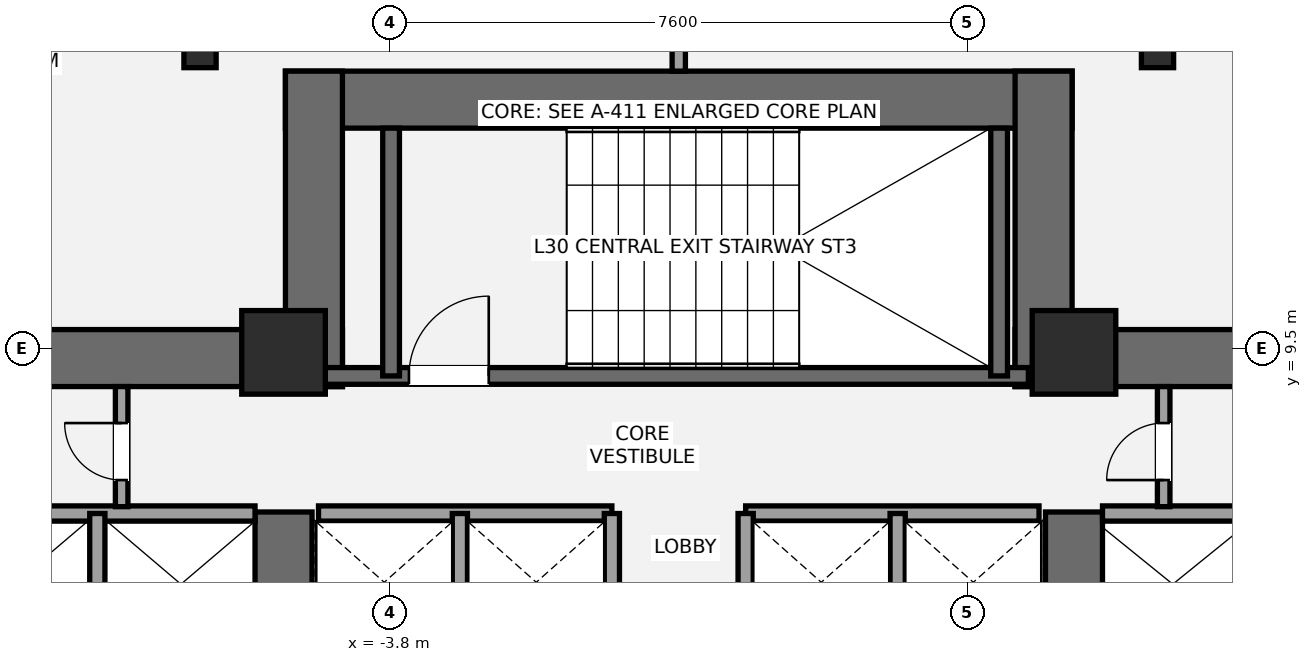
"""IFC4 building model, lengths in metres.
Left out: names, types, materials, properties, quantities, classifications, styles, units other than length and angle.
Written with IfcOpenShell. Run it as: python <this file> out.ifc"""

import sys

from ifc_helpers import new_model, si_unit, direction, frame, frame_2d, origin, origin_2d, place, context, subcontext, project, spatial, rectangle, i_section, extrude, element, fill, save


model = new_model("IFC4")
c1 = context("Model", 3, precision=1e-05, world=origin(), true_north=direction((0.0, 1.0)))
c2 = subcontext(c1, "Body", "Model", "MODEL_VIEW")
j1 = project(units=[si_unit("LENGTHUNIT", "METRE"), si_unit("PLANEANGLEUNIT", "RADIAN")], contexts=[c1])
p1 = place(None, origin())
s1 = spatial("IfcSite", under=j1, at=p1, CompositionType="ELEMENT")
p2 = place(p1, origin())
s2 = spatial("IfcBuilding", under=s1, at=p2, CompositionType="ELEMENT")
p3 = place(p2, frame((0.0, 0.0, 114.1)))
s3 = spatial("IfcBuildingStorey", under=s2, at=p3, CompositionType="ELEMENT", Elevation=114.1)
p4 = place(p3, frame((-13.9, 9.375, 0.0), z_axis=(0.0, 0.0, 1.0), x_axis=(1.0, 0.0, 0.0)))
e1 = element("IfcWall", 1, at=p4, inside=s3, PredefinedType="SHEAR", context=c2, shape_type="SweptSolid", body=[
    extrude(rectangle(XDim=9.475, YDim=0.75, at=frame_2d((4.737, 0.0))), origin(), (0.0, 0.0, 1.0), 3.5),
])
p5 = place(p3, frame((-5.2, 5.35, 0.0), z_axis=(0.0, 0.0, 1.0), x_axis=(0.0, 1.0, 0.0)))
e2 = element("IfcWall", 2, at=p5, inside=s3, PredefinedType="SHEAR", context=c2, shape_type="SweptSolid", body=[
    extrude(rectangle(XDim=2.0, YDim=0.75, at=frame_2d((1.0, 0.0))), origin(), (0.0, 0.0, 1.0), 3.5),
])
p6 = place(p3, frame((4.425, 9.375, 0.0), z_axis=(0.0, 0.0, 1.0), x_axis=(1.0, 0.0, 0.0)))
e3 = element("IfcWall", 3, at=p6, inside=s3, PredefinedType="SHEAR", context=c2, shape_type="SweptSolid", body=[
    extrude(rectangle(XDim=9.475, YDim=0.75, at=frame_2d((4.737, 0.0))), origin(), (0.0, 0.0, 1.0), 3.5),
])
p7 = place(p3, frame((5.2, 5.35, 0.0), z_axis=(0.0, 0.0, 1.0), x_axis=(0.0, 1.0, 0.0)))
e4 = element("IfcWall", 4, at=p7, inside=s3, PredefinedType="SHEAR", context=c2, shape_type="SweptSolid", body=[
    extrude(rectangle(XDim=2.0, YDim=0.75, at=frame_2d((1.0, 0.0))), origin(), (0.0, 0.0, 1.0), 3.5),
])
p8 = place(p3, frame((-5.175, 12.775, 0.0), z_axis=(0.0, 0.0, 1.0), x_axis=(1.0, 0.0, 0.0)))
e5 = element("IfcWall", 5, at=p8, inside=s3, PredefinedType="SHEAR", context=c2, shape_type="SweptSolid", body=[
    extrude(rectangle(XDim=10.35, YDim=0.75, at=frame_2d((5.175, 0.0))), origin(), (0.0, 0.0, 1.0), 3.5),
])
for number, where, z_axis, x_axis in (
    (6, (-4.8, 9.0, 0.0), (0.0, 0.0, 1.0), (0.0, 1.0, 0.0)),
    (7, (4.8, 9.0, 0.0), (0.0, 0.0, 1.0), (0.0, 1.0, 0.0)),
):
    element("IfcWall", number, at=place(p3, frame(where, z_axis=z_axis, x_axis=x_axis)), inside=s3, PredefinedType="SHEAR", context=c2, shape_type="SweptSolid", body=[
        extrude(rectangle(XDim=4.15, YDim=0.75, at=frame_2d((2.075, 0.0))), origin(), (0.0, 0.0, 1.0), 3.5),
    ])
p9 = place(p3, frame((-4.7, 9.14, 0.0), z_axis=(0.0, 0.0, 1.0), x_axis=(1.0, 0.0, 0.0)))
e8 = element("IfcWall", 8, at=p9, inside=s3, PredefinedType="SHEAR", context=c2, shape_type="SweptSolid", body=[
    extrude(rectangle(XDim=9.3, YDim=0.22, at=frame_2d((4.65, 0.0))), origin(), (0.0, 0.0, 1.0), 3.5),
])
p10 = place(p9, frame((1.15, 0.0, 0.0)))
e9 = element("IfcOpeningElement", 9, at=p10, cuts=e8, PredefinedType="OPENING", context=c2, shape_type="SweptSolid", body=[
    extrude(rectangle(XDim=1.05, YDim=2.15, at=frame_2d((0.525, 1.075))), frame((0.0, 0.12, 0.0), z_axis=(0.0, -1.0, 0.0), x_axis=(1.0, 0.0, 0.0)), (0.0, 0.0, 1.0), 0.24),
])
for number, where, z_axis, x_axis in (
    (10, (-3.785, 9.14, 0.0), (0.0, 0.0, 1.0), (0.0, 1.0, 0.0)),
    (11, (4.215, 9.14, 0.0), (0.0, 0.0, 1.0), (0.0, 1.0, 0.0)),
):
    element("IfcWall", number, at=place(p3, frame(where, z_axis=z_axis, x_axis=x_axis)), inside=s3, PredefinedType="SHEAR", context=c2, shape_type="SweptSolid", body=[
        extrude(rectangle(XDim=3.26, YDim=0.22, at=frame_2d((1.63, 0.0))), origin(), (0.0, 0.0, 1.0), 3.5),
    ])
for number, where, z_axis, x_axis in (
    (12, (-5.2, 9.45, 0.0), (0.0, 0.0, 1.0), (1.0, 0.0, 0.0)),
    (13, (5.2, 9.45, 0.0), (0.0, 0.0, 1.0), (1.0, 0.0, 0.0)),
):
    element("IfcColumn", number, at=place(p3, frame(where, z_axis=z_axis, x_axis=x_axis)), inside=s3, PredefinedType="COLUMN", context=c2, shape_type="SweptSolid", body=[
        extrude(rectangle(XDim=1.1, YDim=1.1, at=origin_2d()), origin(), (0.0, 0.0, 1.0), 3.5),
    ])
for number, where, z_axis, x_axis in (
    (14, (6.299, 13.433, 0.0), (0.0, 0.0, 1.0), (1.0, 0.0, 0.0)),
    (15, (-6.299, 13.433, 0.0), (0.0, 0.0, 1.0), (1.0, 0.0, 0.0)),
):
    element("IfcColumn", number, at=place(p3, frame(where, z_axis=z_axis, x_axis=x_axis)), inside=s3, PredefinedType="COLUMN", context=c2, shape_type="SweptSolid", body=[
        extrude(i_section(OverallWidth=0.424, OverallDepth=0.474, WebThickness=0.048, FlangeThickness=0.077, at=origin_2d()), origin(), (0.0, 0.0, 1.0), 3.5),
    ])
p11 = place(p3, frame((-9.78, 7.33, 0.0), z_axis=(0.0, 0.0, 1.0), x_axis=(1.0, 0.0, 0.0)))
e16 = element("IfcWall", 16, at=p11, inside=s3, PredefinedType="SOLIDWALL", context=c2, shape_type="SweptSolid", body=[
    extrude(rectangle(XDim=4.205, YDim=0.2, at=frame_2d((2.103, 0.0))), origin(), (0.0, 0.0, 1.0), 3.31),
])
p12 = place(p3, frame((-7.65, 5.47, 0.0), z_axis=(0.0, 0.0, 1.0), x_axis=(0.0, 1.0, 0.0)))
e17 = element("IfcWall", 17, at=p12, inside=s3, PredefinedType="SOLIDWALL", context=c2, shape_type="SweptSolid", body=[
    extrude(rectangle(XDim=1.86, YDim=0.2, at=frame_2d((0.93, 0.0))), origin(), (0.0, 0.0, 1.0), 3.31),
])
p13 = place(p3, frame((5.575, 7.33, 0.0), z_axis=(0.0, 0.0, 1.0), x_axis=(1.0, 0.0, 0.0)))
e18 = element("IfcWall", 18, at=p13, inside=s3, PredefinedType="SOLIDWALL", context=c2, shape_type="SweptSolid", body=[
    extrude(rectangle(XDim=4.205, YDim=0.2, at=frame_2d((2.103, 0.0))), origin(), (0.0, 0.0, 1.0), 3.31),
])
for number, where, z_axis, x_axis in (
    (19, (-4.74, 7.33, 0.0), (0.0, 0.0, 1.0), (1.0, 0.0, 0.0)),
    (20, (0.88, 7.33, 0.0), (0.0, 0.0, 1.0), (1.0, 0.0, 0.0)),
):
    element("IfcWall", number, at=place(p3, frame(where, z_axis=z_axis, x_axis=x_axis)), inside=s3, PredefinedType="SOLIDWALL", context=c2, shape_type="SweptSolid", body=[
        extrude(rectangle(XDim=3.86, YDim=0.2, at=frame_2d((1.93, 0.0))), origin(), (0.0, 0.0, 1.0), 3.31),
    ])
for number, where, z_axis, x_axis in (
    (21, (-2.88, 5.52, 0.0), (0.0, 0.0, 1.0), (0.0, 1.0, 0.0)),
    (22, (2.88, 5.52, 0.0), (0.0, 0.0, 1.0), (0.0, 1.0, 0.0)),
    (23, (-0.88, 5.52, 0.0), (0.0, 0.0, 1.0), (0.0, 1.0, 0.0)),
    (24, (0.88, 5.52, 0.0), (0.0, 0.0, 1.0), (0.0, 1.0, 0.0)),
):
    element("IfcWall", number, at=place(p3, frame(where, z_axis=z_axis, x_axis=x_axis)), inside=s3, PredefinedType="SOLIDWALL", context=c2, shape_type="SweptSolid", body=[
        extrude(rectangle(XDim=1.81, YDim=0.2, at=frame_2d((0.905, 0.0))), origin(), (0.0, 0.0, 1.0), 3.31),
    ])
p14 = place(p3, frame((-7.33, 7.42, 0.0), z_axis=(0.0, 0.0, 1.0), x_axis=(0.0, 1.0, 0.0)))
e25 = element("IfcWall", 25, at=p14, inside=s3, PredefinedType="PARTITIONING", context=c2, shape_type="SweptSolid", body=[
    extrude(rectangle(XDim=1.58, YDim=0.165, at=frame_2d((0.79, 0.0))), origin(), (0.0, 0.0, 1.0), 3.31),
])
p15 = place(p14, frame((0.35, 0.0, 0.0)))
e26 = element("IfcOpeningElement", 26, at=p15, cuts=e25, PredefinedType="OPENING", context=c2, shape_type="SweptSolid", body=[
    extrude(rectangle(XDim=0.75, YDim=2.1, at=frame_2d((0.375, 1.05))), frame((0.0, 0.093, 0.0), z_axis=(0.0, -1.0, 0.0), x_axis=(1.0, 0.0, 0.0)), (0.0, 0.0, 1.0), 0.185),
])
p16 = place(p3, frame((6.38, 7.42, 0.0), z_axis=(0.0, 0.0, 1.0), x_axis=(0.0, 1.0, 0.0)))
e27 = element("IfcWall", 27, at=p16, inside=s3, PredefinedType="PARTITIONING", context=c2, shape_type="SweptSolid", body=[
    extrude(rectangle(XDim=1.58, YDim=0.165, at=frame_2d((0.79, 0.0))), origin(), (0.0, 0.0, 1.0), 3.31),
])
p17 = place(p16, frame((0.35, 0.0, 0.0)))
e28 = element("IfcOpeningElement", 28, at=p17, cuts=e27, PredefinedType="OPENING", context=c2, shape_type="SweptSolid", body=[
    extrude(rectangle(XDim=0.75, YDim=2.1, at=frame_2d((0.375, 1.05))), frame((0.0, 0.093, 0.0), z_axis=(0.0, -1.0, 0.0), x_axis=(1.0, 0.0, 0.0)), (0.0, 0.0, 1.0), 0.185),
])
p18 = place(p3, frame((0.0, 13.15, 0.0), z_axis=(0.0, 0.0, 1.0), x_axis=(0.0, 1.0, 0.0)))
e29 = element("IfcWall", 29, at=p18, inside=s3, PredefinedType="PARTITIONING", context=c2, shape_type="SweptSolid", body=[
    extrude(rectangle(XDim=4.585, YDim=0.175, at=frame_2d((2.292, 0.0))), origin(), (0.0, 0.0, 1.0), 3.31),
])
p19 = place(p10, origin())
e30 = element("IfcDoor", 30, at=p19, inside=s3, OperationType="SINGLE_SWING_RIGHT", PredefinedType="DOOR", context=c2, shape_type="SweptSolid", body=[
    extrude(rectangle(XDim=1.05, YDim=2.15, at=frame_2d((0.525, 1.075))), frame((0.0, 0.025, 0.0), z_axis=(0.0, -1.0, 0.0), x_axis=(1.0, 0.0, 0.0)), (0.0, 0.0, 1.0), 0.05),
])
fill(e9, e30)
p20 = place(p15, origin())
e31 = element("IfcDoor", 31, at=p20, inside=s3, OperationType="SINGLE_SWING_RIGHT", PredefinedType="DOOR", context=c2, shape_type="SweptSolid", body=[
    extrude(rectangle(XDim=0.75, YDim=2.1, at=frame_2d((0.375, 1.05))), frame((0.0, 0.025, 0.0), z_axis=(0.0, -1.0, 0.0), x_axis=(1.0, 0.0, 0.0)), (0.0, 0.0, 1.0), 0.05),
])
fill(e26, e31)
p21 = place(p17, origin())
e32 = element("IfcDoor", 32, at=p21, inside=s3, OperationType="SINGLE_SWING_LEFT", PredefinedType="DOOR", context=c2, shape_type="SweptSolid", body=[
    extrude(rectangle(XDim=0.75, YDim=2.1, at=frame_2d((0.375, 1.05))), frame((0.0, 0.025, 0.0), z_axis=(0.0, -1.0, 0.0), x_axis=(1.0, 0.0, 0.0)), (0.0, 0.0, 1.0), 0.05),
])
fill(e28, e32)
save(model, sys.argv[1])
